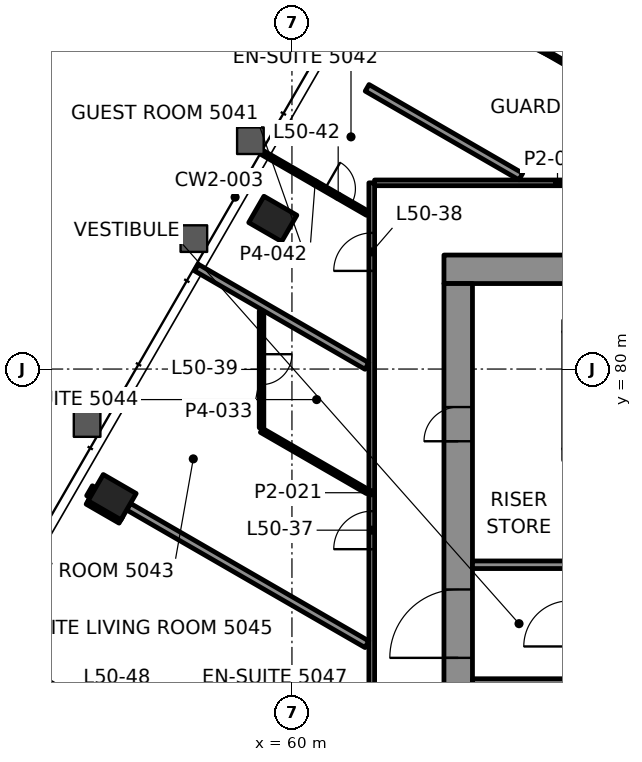
"""IFC4 building model, lengths in metres.
Left out: names, types, materials, properties, quantities, classifications, styles, units other than length and angle.
Written with IfcOpenShell. Run it as: python <this file> out.ifc"""

import sys

from ifc_helpers import new_model, si_unit, direction, frame, frame_2d, origin, origin_2d, place, context, subcontext, project, spatial, rectangle, hollow_rectangle, extrude, element, fill, save


model = new_model("IFC4")
c1 = context("Model", 3, precision=1e-05, world=origin(), true_north=direction((0.0, 1.0)))
c2 = subcontext(c1, "Body", "Model", "MODEL_VIEW")
j1 = project(units=[si_unit("LENGTHUNIT", "METRE"), si_unit("PLANEANGLEUNIT", "RADIAN")], contexts=[c1])
p1 = place(None, origin())
s1 = spatial("IfcSite", under=j1, at=p1, CompositionType="ELEMENT")
p2 = place(p1, origin())
s2 = spatial("IfcBuilding", under=s1, at=p2, CompositionType="ELEMENT")
p3 = place(p2, frame((0.0, 0.0, 214.3)))
s3 = spatial("IfcBuildingStorey", under=s2, at=p3, CompositionType="ELEMENT", Elevation=214.3)
for number, where, z_axis, x_axis in (
    (1, (59.496, 83.951, -0.0), (0.0, 0.0, 1.0), (-0.5, -0.866, 0.0)),
    (2, (55.268, 76.628, -0.0), (0.0, 0.0, 1.0), (-0.5, -0.866, 0.0)),
):
    element("IfcColumn", number, at=place(p3, frame(where, z_axis=z_axis, x_axis=x_axis)), inside=s3, PredefinedType="COLUMN", context=c2, shape_type="SweptSolid", body=[
        extrude(hollow_rectangle(XDim=0.8, YDim=1.0, WallThickness=0.05, at=origin_2d()), origin(), (0.0, 0.0, 1.0), 3.9),
    ])
p4 = place(p3, frame((64.0, 82.625, 0.0), z_axis=(0.0, 0.0, 1.0), x_axis=(1.0, 0.0, 0.0)))
e3 = element("IfcWall", 3, at=p4, inside=s3, PredefinedType="SHEAR", context=c2, shape_type="SweptSolid", body=[
    extrude(rectangle(XDim=22.0, YDim=0.75, at=frame_2d((11.0, 0.0))), origin(), (0.0, 0.0, 1.0), 3.7),
])
p5 = place(p4, frame((3.695, 0.0, 0.0)))
e4 = element("IfcOpeningElement", 4, at=p5, cuts=e3, PredefinedType="OPENING", context=c2, shape_type="SweptSolid", body=[
    extrude(rectangle(XDim=1.0, YDim=2.1, at=frame_2d((0.5, 1.05))), frame((0.0, 0.385, 0.0), z_axis=(0.0, -1.0, 0.0), x_axis=(1.0, 0.0, 0.0)), (0.0, 0.0, 1.0), 0.77),
])
p6 = place(p4, frame((17.505, 0.0, 0.0)))
e5 = element("IfcOpeningElement", 5, at=p6, cuts=e3, PredefinedType="OPENING", context=c2, shape_type="SweptSolid", body=[
    extrude(rectangle(XDim=1.0, YDim=2.1, at=frame_2d((0.5, 1.05))), frame((0.0, 0.385, 0.0), z_axis=(0.0, -1.0, 0.0), x_axis=(1.0, 0.0, 0.0)), (0.0, 0.0, 1.0), 0.77),
])
p7 = place(p4, frame((10.65, 0.0, 0.0)))
e6 = element("IfcOpeningElement", 6, at=p7, cuts=e3, PredefinedType="OPENING", context=c2, shape_type="SweptSolid", body=[
    extrude(rectangle(XDim=0.9, YDim=2.1, at=frame_2d((0.45, 1.05))), frame((0.0, 0.385, 0.0), z_axis=(0.0, -1.0, 0.0), x_axis=(1.0, 0.0, 0.0)), (0.0, 0.0, 1.0), 0.77),
])
p8 = place(p3, frame((64.375, 67.75, 0.0), z_axis=(0.0, 0.0, 1.0), x_axis=(0.0, 1.0, 0.0)))
e7 = element("IfcWall", 7, at=p8, inside=s3, PredefinedType="SHEAR", context=c2, shape_type="SweptSolid", body=[
    extrude(rectangle(XDim=14.5, YDim=0.75, at=frame_2d((7.25, 0.0))), origin(), (0.0, 0.0, 1.0), 3.7),
])
p9 = place(p8, frame((4.65, 0.0, 0.0)))
e8 = element("IfcOpeningElement", 8, at=p9, cuts=e7, PredefinedType="OPENING", context=c2, shape_type="SweptSolid", body=[
    extrude(rectangle(XDim=1.8, YDim=2.1, at=frame_2d((0.9, 1.05))), frame((0.0, 0.385, 0.0), z_axis=(0.0, -1.0, 0.0), x_axis=(1.0, 0.0, 0.0)), (0.0, 0.0, 1.0), 0.77),
])
p10 = place(p8, frame((2.55, 0.0, 0.0)))
e9 = element("IfcOpeningElement", 9, at=p10, cuts=e7, PredefinedType="OPENING", context=c2, shape_type="SweptSolid", body=[
    extrude(rectangle(XDim=0.9, YDim=2.1, at=frame_2d((0.45, 1.05))), frame((0.0, 0.385, 0.0), z_axis=(0.0, -1.0, 0.0), x_axis=(1.0, 0.0, 0.0)), (0.0, 0.0, 1.0), 0.77),
])
p11 = place(p8, frame((10.35, 0.0, 0.0)))
e10 = element("IfcOpeningElement", 10, at=p11, cuts=e7, PredefinedType="OPENING", context=c2, shape_type="SweptSolid", body=[
    extrude(rectangle(XDim=0.9, YDim=2.1, at=frame_2d((0.45, 1.05))), frame((0.0, 0.385, 0.0), z_axis=(0.0, -1.0, 0.0), x_axis=(1.0, 0.0, 0.0)), (0.0, 0.0, 1.0), 0.77),
])
p12 = place(p3, frame((62.175, 84.9, 0.0), z_axis=(0.0, 0.0, 1.0), x_axis=(1.0, 0.0, 0.0)))
e11 = element("IfcWall", 11, at=p12, inside=s3, PredefinedType="PARTITIONING", context=c2, shape_type="SweptSolid", body=[
    extrude(rectangle(XDim=9.625, YDim=0.15, at=frame_2d((4.812, 0.0))), origin(), (0.0, 0.0, 1.0), 3.097),
])
p13 = place(p12, frame((6.326, 0.0, 0.0)))
e12 = element("IfcOpeningElement", 12, at=p13, cuts=e11, PredefinedType="OPENING", context=c2, shape_type="SweptSolid", body=[
    extrude(rectangle(XDim=0.9, YDim=2.1, at=frame_2d((0.45, 1.05))), frame((0.0, 0.085, 0.0), z_axis=(0.0, -1.0, 0.0), x_axis=(1.0, 0.0, 0.0)), (0.0, 0.0, 1.0), 0.17),
])
p14 = place(p3, frame((54.685, 76.619, 0.0), z_axis=(0.0, 0.0, 1.0), x_axis=(0.499816412211, 0.866131372301, 0.0)))
e13 = element("IfcWall", 13, at=p14, inside=s3, PredefinedType="PARTITIONING", context=c2, shape_type="SweptSolid", body=[
    extrude(rectangle(XDim=0.3, YDim=0.2, at=frame_2d((0.15, 0.0))), origin(), (0.0, 0.0, 1.0), 3.1),
])
p15 = place(p3, frame((62.1, 68.591, 0.0), z_axis=(0.0, 0.0, 1.0), x_axis=(0.0, 1.0, 0.0)))
e14 = element("IfcWall", 14, at=p15, inside=s3, PredefinedType="PARTITIONING", context=c2, shape_type="SweptSolid", body=[
    extrude(rectangle(XDim=16.309, YDim=0.15, at=frame_2d((8.154, 0.0))), origin(), (0.0, 0.0, 1.0), 3.1),
])
p16 = place(p15, frame((6.668, 0.0, 0.0)))
e15 = element("IfcOpeningElement", 15, at=p16, cuts=e14, PredefinedType="OPENING", context=c2, shape_type="SweptSolid", body=[
    extrude(rectangle(XDim=1.0, YDim=2.1, at=frame_2d((0.5, 1.05))), frame((0.0, 0.085, 0.0), z_axis=(0.0, -1.0, 0.0), x_axis=(1.0, 0.0, 0.0)), (0.0, 0.0, 1.0), 0.17),
])
p17 = place(p15, frame((13.991, 0.0, 0.0)))
e16 = element("IfcOpeningElement", 16, at=p17, cuts=e14, PredefinedType="OPENING", context=c2, shape_type="SweptSolid", body=[
    extrude(rectangle(XDim=1.0, YDim=2.1, at=frame_2d((0.5, 1.05))), frame((0.0, 0.085, 0.0), z_axis=(0.0, -1.0, 0.0), x_axis=(1.0, 0.0, 0.0)), (0.0, 0.0, 1.0), 0.17),
])
p18 = place(p3, frame((59.2, 81.526, 0.0), z_axis=(0.0, 0.0, 1.0), x_axis=(0.0, -1.0, 0.0)))
e17 = element("IfcWall", 17, at=p18, inside=s3, PredefinedType="PARTITIONING", context=c2, shape_type="SweptSolid", body=[
    extrude(rectangle(XDim=3.07, YDim=0.12, at=frame_2d((1.535, 0.0))), origin(), (0.0, 0.0, 1.0), 3.1),
])
p19 = place(p18, frame((1.135, 0.0, 0.0)))
e18 = element("IfcOpeningElement", 18, at=p19, cuts=e17, PredefinedType="OPENING", context=c2, shape_type="SweptSolid", body=[
    extrude(rectangle(XDim=0.8, YDim=2.1, at=frame_2d((0.4, 1.05))), frame((0.0, 0.07, 0.0), z_axis=(0.0, -1.0, 0.0), x_axis=(1.0, 0.0, 0.0)), (0.0, 0.0, 1.0), 0.14),
])
p20 = place(p3, frame((69.799, 86.546, 0.0), z_axis=(0.0, 0.0, 1.0), x_axis=(-0.866025579307, 0.499999695987, 0.0)))
e19 = element("IfcWall", 19, at=p20, inside=s3, PredefinedType="PARTITIONING", context=c2, shape_type="SweptSolid", body=[
    extrude(rectangle(XDim=4.04, YDim=0.1, at=frame_2d((2.02, 0.0))), origin(), (0.0, 0.0, 1.0), 3.1),
])
p21 = place(p3, frame((66.023, 85.065, 0.0), z_axis=(0.0, 0.0, 1.0), x_axis=(-0.866034108906, 0.499984921984, 0.0)))
e20 = element("IfcWall", 20, at=p21, inside=s3, PredefinedType="PARTITIONING", context=c2, shape_type="SweptSolid", body=[
    extrude(rectangle(XDim=4.67, YDim=0.2, at=frame_2d((2.335, 0.0))), origin(), (0.0, 0.0, 1.0), 3.1),
])
p22 = place(p3, frame((59.23, 85.691, 0.0), z_axis=(0.0, 0.0, 1.0), x_axis=(0.866042722185, -0.49997000245, 0.0)))
e21 = element("IfcWall", 21, at=p22, inside=s3, PredefinedType="PARTITIONING", context=c2, shape_type="SweptSolid", body=[
    extrude(rectangle(XDim=3.187, YDim=0.12, at=frame_2d((1.594, 0.0))), origin(), (0.0, 0.0, 1.0), 3.022),
])
p23 = place(p22, frame((1.894, 0.0, 0.0)))
e22 = element("IfcOpeningElement", 22, at=p23, cuts=e21, PredefinedType="OPENING", context=c2, shape_type="SweptSolid", body=[
    extrude(rectangle(XDim=0.8, YDim=2.1, at=frame_2d((0.4, 1.05))), frame((0.0, 0.07, 0.0), z_axis=(0.0, -1.0, 0.0), x_axis=(1.0, 0.0, 0.0)), (0.0, 0.0, 1.0), 0.14),
])
p24 = place(p3, frame((61.973, 80.08, 0.0), z_axis=(0.0, 0.0, 1.0), x_axis=(-0.86601608377, 0.500016142392, 0.0)))
e23 = element("IfcWall", 23, at=p24, inside=s3, PredefinedType="PARTITIONING", context=c2, shape_type="SweptSolid", body=[
    extrude(rectangle(XDim=5.181, YDim=0.2, at=frame_2d((2.59, 0.0))), origin(), (0.0, 0.0, 1.0), 3.022),
])
p25 = place(p3, frame((61.99, 76.775, 0.0), z_axis=(0.0, 0.0, 1.0), x_axis=(-0.866010186656, 0.500026355914, 0.0)))
e24 = element("IfcWall", 24, at=p25, inside=s3, PredefinedType="PARTITIONING", context=c2, shape_type="SweptSolid", body=[
    extrude(rectangle(XDim=3.222, YDim=0.12, at=frame_2d((1.611, 0.0))), origin(), (0.0, 0.0, 1.0), 3.1),
])
p26 = place(p3, frame((61.973, 72.757, 0.0), z_axis=(0.0, 0.0, 1.0), x_axis=(-0.866027278279, 0.499996753267, 0.0)))
e25 = element("IfcWall", 25, at=p26, inside=s3, PredefinedType="PARTITIONING", context=c2, shape_type="SweptSolid", body=[
    extrude(rectangle(XDim=7.242, YDim=0.2, at=frame_2d((3.621, 0.0))), origin(), (0.0, 0.0, 1.0), 3.1),
])
p27 = place(p3, frame((55.501, 76.032, 0.0), z_axis=(0.0, 0.0, 1.0), x_axis=(-0.866010750942, 0.50002537861, 0.0)))
e26 = element("IfcWall", 26, at=p27, inside=s3, PredefinedType="PARTITIONING", context=c2, shape_type="SweptSolid", body=[
    extrude(rectangle(XDim=1.0, YDim=0.2, at=frame_2d((0.5, 0.0))), origin(), (0.0, 0.0, 1.0), 3.022),
])
p28 = place(p3, frame((57.571, 69.441, 0.0), z_axis=(0.0, 0.0, 1.0), x_axis=(-0.866019636692, 0.500009988763, 0.0)))
e27 = element("IfcWall", 27, at=p28, inside=s3, PredefinedType="PARTITIONING", context=c2, shape_type="SweptSolid", body=[
    extrude(rectangle(XDim=6.688, YDim=0.1, at=frame_2d((3.344, 0.0))), origin(), (0.0, 0.0, 1.0), 3.022),
])
p29 = place(p28, frame((2.644, 0.0, 0.0)))
e28 = element("IfcOpeningElement", 28, at=p29, cuts=e27, PredefinedType="OPENING", context=c2, shape_type="SweptSolid", body=[
    extrude(rectangle(XDim=0.9, YDim=2.1, at=frame_2d((0.45, 1.05))), frame((0.0, 0.06, 0.0), z_axis=(0.0, -1.0, 0.0), x_axis=(1.0, 0.0, 0.0)), (0.0, 0.0, 1.0), 0.12),
])
p30 = place(p3, frame((64.75, 71.75, 0.0), z_axis=(0.0, 0.0, 1.0), x_axis=(1.0, 0.0, 0.0)))
e29 = element("IfcWall", 29, at=p30, inside=s3, PredefinedType="PARTITIONING", context=c2, shape_type="SweptSolid", body=[
    extrude(rectangle(XDim=5.55, YDim=0.2, at=frame_2d((2.775, 0.0))), origin(), (0.0, 0.0, 1.0), 3.7),
])
p31 = place(p3, frame((64.75, 74.85, 0.0), z_axis=(0.0, 0.0, 1.0), x_axis=(1.0, 0.0, 0.0)))
e30 = element("IfcWall", 30, at=p31, inside=s3, PredefinedType="PARTITIONING", context=c2, shape_type="SweptSolid", body=[
    extrude(rectangle(XDim=2.45, YDim=0.2, at=frame_2d((1.225, 0.0))), origin(), (0.0, 0.0, 1.0), 3.7),
])
p32 = place(p16, origin())
e31 = element("IfcDoor", 31, at=p32, inside=s3, OperationType="SINGLE_SWING_RIGHT", PredefinedType="DOOR", context=c2, shape_type="SweptSolid", body=[
    extrude(rectangle(XDim=1.0, YDim=2.1, at=frame_2d((0.5, 1.05))), frame((0.0, 0.025, 0.0), z_axis=(0.0, -1.0, 0.0), x_axis=(1.0, 0.0, 0.0)), (0.0, 0.0, 1.0), 0.05),
])
fill(e15, e31)
p33 = place(p17, origin())
e32 = element("IfcDoor", 32, at=p33, inside=s3, OperationType="SINGLE_SWING_RIGHT", PredefinedType="DOOR", context=c2, shape_type="SweptSolid", body=[
    extrude(rectangle(XDim=1.0, YDim=2.1, at=frame_2d((0.5, 1.05))), frame((0.0, 0.025, 0.0), z_axis=(0.0, -1.0, 0.0), x_axis=(1.0, 0.0, 0.0)), (0.0, 0.0, 1.0), 0.05),
])
fill(e16, e32)
p34 = place(p19, origin())
e33 = element("IfcDoor", 33, at=p34, inside=s3, OperationType="SINGLE_SWING_RIGHT", PredefinedType="DOOR", context=c2, shape_type="SweptSolid", body=[
    extrude(rectangle(XDim=0.8, YDim=2.1, at=frame_2d((0.4, 1.05))), frame((0.0, 0.025, 0.0), z_axis=(0.0, -1.0, 0.0), x_axis=(1.0, 0.0, 0.0)), (0.0, 0.0, 1.0), 0.05),
])
fill(e18, e33)
p35 = place(p23, origin())
e34 = element("IfcDoor", 34, at=p35, inside=s3, OperationType="SINGLE_SWING_RIGHT", PredefinedType="DOOR", context=c2, shape_type="SweptSolid", body=[
    extrude(rectangle(XDim=0.8, YDim=2.1, at=frame_2d((0.4, 1.05))), frame((0.0, 0.025, 0.0), z_axis=(0.0, -1.0, 0.0), x_axis=(1.0, 0.0, 0.0)), (0.0, 0.0, 1.0), 0.05),
])
fill(e22, e34)
p36 = place(p9, origin())
e35 = element("IfcDoor", 35, at=p36, inside=s3, OperationType="SINGLE_SWING_LEFT", PredefinedType="DOOR", context=c2, shape_type="SweptSolid", body=[
    extrude(rectangle(XDim=1.8, YDim=2.1, at=frame_2d((0.9, 1.05))), frame((0.0, 0.095, 0.0), z_axis=(0.0, -1.0, 0.0), x_axis=(1.0, 0.0, 0.0)), (0.0, 0.0, 1.0), 0.19),
])
fill(e8, e35)
p37 = place(p11, origin())
e36 = element("IfcDoor", 36, at=p37, inside=s3, OperationType="SINGLE_SWING_RIGHT", PredefinedType="DOOR", context=c2, shape_type="SweptSolid", body=[
    extrude(rectangle(XDim=0.9, YDim=2.1, at=frame_2d((0.45, 1.05))), frame((0.0, 0.095, 0.0), z_axis=(0.0, -1.0, 0.0), x_axis=(1.0, 0.0, 0.0)), (0.0, 0.0, 1.0), 0.19),
])
fill(e10, e36)
save(model, sys.argv[1])
